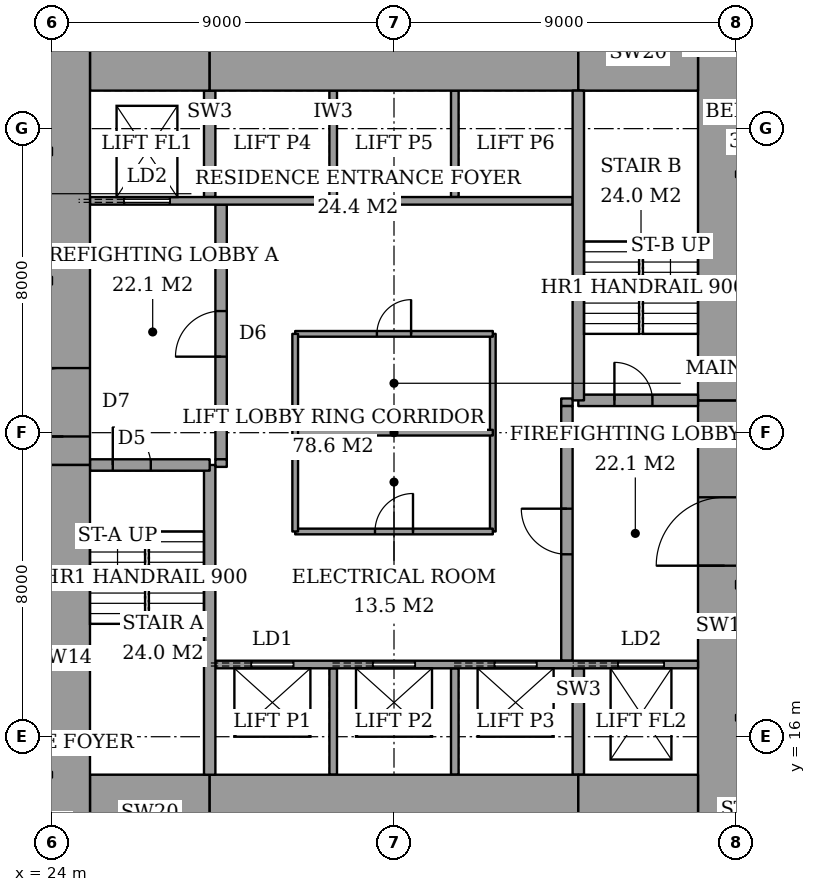
"""IFC4 building model, lengths in metres.
Left out: names, types, materials, properties, quantities, classifications, styles, units other than length and angle.
Written with IfcOpenShell. Run it as: python <this file> out.ifc"""

import sys

from ifc_helpers import new_model, si_unit, direction, frame, frame_2d, origin, place, context, subcontext, project, spatial, rectangle, extrude, element, fill, save


model = new_model("IFC4")
c1 = context("Model", 3, precision=1e-05, world=origin(), true_north=direction((0.0, 1.0)))
c2 = subcontext(c1, "Body", "Model", "MODEL_VIEW")
j1 = project(units=[si_unit("LENGTHUNIT", "METRE"), si_unit("PLANEANGLEUNIT", "RADIAN")], contexts=[c1])
p1 = place(None, origin())
s1 = spatial("IfcSite", under=j1, at=p1, CompositionType="ELEMENT")
p2 = place(p1, origin())
s2 = spatial("IfcBuilding", under=s1, at=p2, CompositionType="ELEMENT")
p3 = place(p2, frame((0.0, 0.0, 146.6)))
s3 = spatial("IfcBuildingStorey", under=s2, at=p3, CompositionType="ELEMENT", Elevation=146.6)
p4 = place(p3, frame((25.0, 14.0, 0.0), z_axis=(0.0, 0.0, 1.0), x_axis=(1.0, 0.0, 0.0)))
e1 = element("IfcWall", 1, at=p4, inside=s3, PredefinedType="SHEAR", context=c2, shape_type="SweptSolid", body=[
    extrude(rectangle(XDim=3.15, YDim=2.0, at=frame_2d((1.575, 0.0))), origin(), (0.0, 0.0, 1.0), 3.6),
])
p5 = place(p3, frame((28.15, 14.0, 0.0), z_axis=(0.0, 0.0, 1.0), x_axis=(1.0, 0.0, 0.0)))
e2 = element("IfcWall", 2, at=p5, inside=s3, PredefinedType="SHEAR", context=c2, shape_type="SweptSolid", body=[
    extrude(rectangle(XDim=9.7, YDim=2.0, at=frame_2d((4.85, 0.0))), origin(), (0.0, 0.0, 1.0), 3.6),
])
for number, where, z_axis, x_axis in (
    (3, (37.85, 14.0, 0.0), (0.0, 0.0, 1.0), (1.0, 0.0, 0.0)),
    (4, (25.0, 34.0, 0.0), (0.0, 0.0, 1.0), (1.0, 0.0, 0.0)),
):
    element("IfcWall", number, at=place(p3, frame(where, z_axis=z_axis, x_axis=x_axis)), inside=s3, PredefinedType="SHEAR", context=c2, shape_type="SweptSolid", body=[
        extrude(rectangle(XDim=3.15, YDim=2.0, at=frame_2d((1.575, 0.0))), origin(), (0.0, 0.0, 1.0), 3.6),
    ])
p6 = place(p3, frame((28.15, 34.0, 0.0), z_axis=(0.0, 0.0, 1.0), x_axis=(1.0, 0.0, 0.0)))
e5 = element("IfcWall", 5, at=p6, inside=s3, PredefinedType="SHEAR", context=c2, shape_type="SweptSolid", body=[
    extrude(rectangle(XDim=9.7, YDim=2.0, at=frame_2d((4.85, 0.0))), origin(), (0.0, 0.0, 1.0), 3.6),
])
p7 = place(p3, frame((37.85, 34.0, 0.0), z_axis=(0.0, 0.0, 1.0), x_axis=(1.0, 0.0, 0.0)))
e6 = element("IfcWall", 6, at=p7, inside=s3, PredefinedType="SHEAR", context=c2, shape_type="SweptSolid", body=[
    extrude(rectangle(XDim=3.15, YDim=2.0, at=frame_2d((1.575, 0.0))), origin(), (0.0, 0.0, 1.0), 3.6),
])
p8 = place(p3, frame((24.3, 13.0, 0.0), z_axis=(0.0, 0.0, 1.0), x_axis=(0.0, 1.0, 0.0)))
e7 = element("IfcWall", 7, at=p8, inside=s3, PredefinedType="SHEAR", context=c2, shape_type="SweptSolid", body=[
    extrude(rectangle(XDim=10.15, YDim=1.4, at=frame_2d((5.075, 0.0))), origin(), (0.0, 0.0, 1.0), 3.6),
])
p9 = place(p3, frame((24.3, 23.15, 0.0), z_axis=(0.0, 0.0, 1.0), x_axis=(0.0, 1.0, 0.0)))
e8 = element("IfcWall", 8, at=p9, inside=s3, PredefinedType="SHEAR", context=c2, shape_type="SweptSolid", body=[
    extrude(rectangle(XDim=11.85, YDim=1.4, at=frame_2d((5.925, 0.0))), origin(), (0.0, 0.0, 1.0), 3.6),
])
p10 = place(p9, frame((0.75, 0.0, 0.0)))
e9 = element("IfcOpeningElement", 9, at=p10, cuts=e8, PredefinedType="OPENING", context=c2, shape_type="SweptSolid", body=[
    extrude(rectangle(XDim=1.8, YDim=2.4, at=frame_2d((0.9, 1.2))), frame((0.0, 0.71, 0.0), z_axis=(0.0, -1.0, 0.0), x_axis=(1.0, 0.0, 0.0)), (0.0, 0.0, 1.0), 1.42),
])
p11 = place(p3, frame((41.7, 13.0, 0.0), z_axis=(0.0, 0.0, 1.0), x_axis=(0.0, 1.0, 0.0)))
e10 = element("IfcWall", 10, at=p11, inside=s3, PredefinedType="SHEAR", context=c2, shape_type="SweptSolid", body=[
    extrude(rectangle(XDim=11.85, YDim=1.4, at=frame_2d((5.925, 0.0))), origin(), (0.0, 0.0, 1.0), 3.6),
])
p12 = place(p11, frame((7.5, 0.0, 0.0)))
e11 = element("IfcOpeningElement", 11, at=p12, cuts=e10, PredefinedType="OPENING", context=c2, shape_type="SweptSolid", body=[
    extrude(rectangle(XDim=1.8, YDim=2.4, at=frame_2d((0.9, 1.2))), frame((0.0, 0.71, 0.0), z_axis=(0.0, -1.0, 0.0), x_axis=(1.0, 0.0, 0.0)), (0.0, 0.0, 1.0), 1.42),
])
p13 = place(p3, frame((41.7, 24.85, 0.0), z_axis=(0.0, 0.0, 1.0), x_axis=(0.0, 1.0, 0.0)))
e12 = element("IfcWall", 12, at=p13, inside=s3, PredefinedType="SHEAR", context=c2, shape_type="SweptSolid", body=[
    extrude(rectangle(XDim=10.15, YDim=1.4, at=frame_2d((5.075, 0.0))), origin(), (0.0, 0.0, 1.0), 3.6),
])
p14 = place(p3, frame((28.15, 15.0, 0.0), z_axis=(0.0, 0.0, 1.0), x_axis=(0.0, 1.0, 0.0)))
e13 = element("IfcWall", 13, at=p14, inside=s3, PredefinedType="SHEAR", context=c2, shape_type="SweptSolid", body=[
    extrude(rectangle(XDim=8.15, YDim=0.3, at=frame_2d((4.075, 0.0))), origin(), (0.0, 0.0, 1.0), 3.6),
])
p15 = place(p3, frame((25.0, 23.15, 0.0), z_axis=(0.0, 0.0, 1.0), x_axis=(1.0, 0.0, 0.0)))
e14 = element("IfcWall", 14, at=p15, inside=s3, PredefinedType="SHEAR", context=c2, shape_type="SweptSolid", body=[
    extrude(rectangle(XDim=3.15, YDim=0.3, at=frame_2d((1.575, 0.0))), origin(), (0.0, 0.0, 1.0), 3.6),
])
p16 = place(p15, frame((0.6, 0.0, 0.0)))
e15 = element("IfcOpeningElement", 15, at=p16, cuts=e14, PredefinedType="OPENING", context=c2, shape_type="SweptSolid", body=[
    extrude(rectangle(XDim=1.0, YDim=2.1, at=frame_2d((0.5, 1.05))), frame((0.0, 0.16, 0.0), z_axis=(0.0, -1.0, 0.0), x_axis=(1.0, 0.0, 0.0)), (0.0, 0.0, 1.0), 0.32),
])
p17 = place(p3, frame((37.85, 24.85, 0.0), z_axis=(0.0, 0.0, 1.0), x_axis=(0.0, 1.0, 0.0)))
e16 = element("IfcWall", 16, at=p17, inside=s3, PredefinedType="SHEAR", context=c2, shape_type="SweptSolid", body=[
    extrude(rectangle(XDim=8.15, YDim=0.3, at=frame_2d((4.075, 0.0))), origin(), (0.0, 0.0, 1.0), 3.6),
])
p18 = place(p3, frame((37.85, 24.85, 0.0), z_axis=(0.0, 0.0, 1.0), x_axis=(1.0, 0.0, 0.0)))
e17 = element("IfcWall", 17, at=p18, inside=s3, PredefinedType="SHEAR", context=c2, shape_type="SweptSolid", body=[
    extrude(rectangle(XDim=3.15, YDim=0.3, at=frame_2d((1.575, 0.0))), origin(), (0.0, 0.0, 1.0), 3.6),
])
p19 = place(p18, frame((0.95, 0.0, 0.0)))
e18 = element("IfcOpeningElement", 18, at=p19, cuts=e17, PredefinedType="OPENING", context=c2, shape_type="SweptSolid", body=[
    extrude(rectangle(XDim=1.0, YDim=2.1, at=frame_2d((0.5, 1.05))), frame((0.0, 0.16, 0.0), z_axis=(0.0, -1.0, 0.0), x_axis=(1.0, 0.0, 0.0)), (0.0, 0.0, 1.0), 0.32),
])
p20 = place(p3, frame((28.45, 23.3, 0.0), z_axis=(0.0, 0.0, 1.0), x_axis=(0.0, 1.0, 0.0)))
e19 = element("IfcWall", 19, at=p20, inside=s3, PredefinedType="PARTITIONING", context=c2, shape_type="SweptSolid", body=[
    extrude(rectangle(XDim=6.7, YDim=0.3, at=frame_2d((3.35, 0.0))), origin(), (0.0, 0.0, 1.0), 3.6),
])
p21 = place(p20, frame((2.7, 0.0, 0.0)))
e20 = element("IfcOpeningElement", 20, at=p21, cuts=e19, PredefinedType="OPENING", context=c2, shape_type="SweptSolid", body=[
    extrude(rectangle(XDim=1.2, YDim=2.1, at=frame_2d((0.6, 1.05))), frame((0.0, 0.16, 0.0), z_axis=(0.0, -1.0, 0.0), x_axis=(1.0, 0.0, 0.0)), (0.0, 0.0, 1.0), 0.32),
])
p22 = place(p3, frame((37.55, 18.0, 0.0), z_axis=(0.0, 0.0, 1.0), x_axis=(0.0, 1.0, 0.0)))
e21 = element("IfcWall", 21, at=p22, inside=s3, PredefinedType="PARTITIONING", context=c2, shape_type="SweptSolid", body=[
    extrude(rectangle(XDim=6.7, YDim=0.3, at=frame_2d((3.35, 0.0))), origin(), (0.0, 0.0, 1.0), 3.6),
])
p23 = place(p22, frame((2.8, 0.0, 0.0)))
e22 = element("IfcOpeningElement", 22, at=p23, cuts=e21, PredefinedType="OPENING", context=c2, shape_type="SweptSolid", body=[
    extrude(rectangle(XDim=1.2, YDim=2.1, at=frame_2d((0.6, 1.05))), frame((0.0, 0.16, 0.0), z_axis=(0.0, -1.0, 0.0), x_axis=(1.0, 0.0, 0.0)), (0.0, 0.0, 1.0), 0.32),
])
p24 = place(p3, frame((28.3, 17.9, 0.0), z_axis=(0.0, 0.0, 1.0), x_axis=(1.0, 0.0, 0.0)))
e23 = element("IfcWall", 23, at=p24, inside=s3, PredefinedType="PARTITIONING", context=c2, shape_type="SweptSolid", body=[
    extrude(rectangle(XDim=12.7, YDim=0.2, at=frame_2d((6.35, 0.0))), origin(), (0.0, 0.0, 1.0), 3.6),
])
p25 = place(p24, frame((0.95, 0.0, 0.0)))
e24 = element("IfcOpeningElement", 24, at=p25, cuts=e23, PredefinedType="OPENING", context=c2, shape_type="SweptSolid", body=[
    extrude(rectangle(XDim=1.1, YDim=2.1, at=frame_2d((0.55, 1.05))), frame((0.0, 0.11, 0.0), z_axis=(0.0, -1.0, 0.0), x_axis=(1.0, 0.0, 0.0)), (0.0, 0.0, 1.0), 0.22),
])
p26 = place(p24, frame((4.15, 0.0, 0.0)))
e25 = element("IfcOpeningElement", 25, at=p26, cuts=e23, PredefinedType="OPENING", context=c2, shape_type="SweptSolid", body=[
    extrude(rectangle(XDim=1.1, YDim=2.1, at=frame_2d((0.55, 1.05))), frame((0.0, 0.11, 0.0), z_axis=(0.0, -1.0, 0.0), x_axis=(1.0, 0.0, 0.0)), (0.0, 0.0, 1.0), 0.22),
])
p27 = place(p24, frame((7.35, 0.0, 0.0)))
e26 = element("IfcOpeningElement", 26, at=p27, cuts=e23, PredefinedType="OPENING", context=c2, shape_type="SweptSolid", body=[
    extrude(rectangle(XDim=1.1, YDim=2.1, at=frame_2d((0.55, 1.05))), frame((0.0, 0.11, 0.0), z_axis=(0.0, -1.0, 0.0), x_axis=(1.0, 0.0, 0.0)), (0.0, 0.0, 1.0), 0.22),
])
p28 = place(p24, frame((10.6, 0.0, 0.0)))
e27 = element("IfcOpeningElement", 27, at=p28, cuts=e23, PredefinedType="OPENING", context=c2, shape_type="SweptSolid", body=[
    extrude(rectangle(XDim=1.2, YDim=2.1, at=frame_2d((0.6, 1.05))), frame((0.0, 0.11, 0.0), z_axis=(0.0, -1.0, 0.0), x_axis=(1.0, 0.0, 0.0)), (0.0, 0.0, 1.0), 0.22),
])
p29 = place(p3, frame((25.0, 30.1, 0.0), z_axis=(0.0, 0.0, 1.0), x_axis=(1.0, 0.0, 0.0)))
e28 = element("IfcWall", 28, at=p29, inside=s3, PredefinedType="PARTITIONING", context=c2, shape_type="SweptSolid", body=[
    extrude(rectangle(XDim=12.7, YDim=0.2, at=frame_2d((6.35, 0.0))), origin(), (0.0, 0.0, 1.0), 3.6),
])
p30 = place(p29, frame((0.9, 0.0, 0.0)))
e29 = element("IfcOpeningElement", 29, at=p30, cuts=e28, PredefinedType="OPENING", context=c2, shape_type="SweptSolid", body=[
    extrude(rectangle(XDim=1.2, YDim=2.1, at=frame_2d((0.6, 1.05))), frame((0.0, 0.11, 0.0), z_axis=(0.0, -1.0, 0.0), x_axis=(1.0, 0.0, 0.0)), (0.0, 0.0, 1.0), 0.22),
])
for number, where, z_axis, x_axis in (
    (30, (31.4, 15.0, 0.0), (0.0, 0.0, 1.0), (0.0, 1.0, 0.0)),
    (31, (34.6, 15.0, 0.0), (0.0, 0.0, 1.0), (0.0, 1.0, 0.0)),
):
    element("IfcWall", number, at=place(p3, frame(where, z_axis=z_axis, x_axis=x_axis)), inside=s3, PredefinedType="PARTITIONING", context=c2, shape_type="SweptSolid", body=[
        extrude(rectangle(XDim=2.8, YDim=0.2, at=frame_2d((1.4, 0.0))), origin(), (0.0, 0.0, 1.0), 3.6),
    ])
p31 = place(p3, frame((37.85, 15.0, 0.0), z_axis=(0.0, 0.0, 1.0), x_axis=(0.0, 1.0, 0.0)))
e32 = element("IfcWall", 32, at=p31, inside=s3, PredefinedType="SHEAR", context=c2, shape_type="SweptSolid", body=[
    extrude(rectangle(XDim=2.8, YDim=0.3, at=frame_2d((1.4, 0.0))), origin(), (0.0, 0.0, 1.0), 3.6),
])
for number, where, z_axis, x_axis in (
    (33, (31.4, 30.2, 0.0), (0.0, 0.0, 1.0), (0.0, 1.0, 0.0)),
    (34, (34.6, 30.2, 0.0), (0.0, 0.0, 1.0), (0.0, 1.0, 0.0)),
):
    element("IfcWall", number, at=place(p3, frame(where, z_axis=z_axis, x_axis=x_axis)), inside=s3, PredefinedType="PARTITIONING", context=c2, shape_type="SweptSolid", body=[
        extrude(rectangle(XDim=2.8, YDim=0.2, at=frame_2d((1.4, 0.0))), origin(), (0.0, 0.0, 1.0), 3.6),
    ])
p32 = place(p3, frame((28.15, 30.2, 0.0), z_axis=(0.0, 0.0, 1.0), x_axis=(0.0, 1.0, 0.0)))
e35 = element("IfcWall", 35, at=p32, inside=s3, PredefinedType="SHEAR", context=c2, shape_type="SweptSolid", body=[
    extrude(rectangle(XDim=2.8, YDim=0.3, at=frame_2d((1.4, 0.0))), origin(), (0.0, 0.0, 1.0), 3.6),
])
for number, where, z_axis, x_axis in (
    (36, (28.3, 23.2, 0.0), (0.0, 0.0, 1.0), (1.0, 0.0, 0.0)),
    (37, (37.4, 24.8, 0.0), (0.0, 0.0, 1.0), (1.0, 0.0, 0.0)),
):
    element("IfcWall", number, at=place(p3, frame(where, z_axis=z_axis, x_axis=x_axis)), inside=s3, PredefinedType="PARTITIONING", context=c2, shape_type="SweptSolid", body=[
        extrude(rectangle(XDim=0.3, YDim=0.2, at=frame_2d((0.15, 0.0))), origin(), (0.0, 0.0, 1.0), 3.6),
    ])
p33 = place(p3, frame((30.4, 21.4, 0.0), z_axis=(0.0, 0.0, 1.0), x_axis=(1.0, 0.0, 0.0)))
e38 = element("IfcWall", 38, at=p33, inside=s3, PredefinedType="PARTITIONING", context=c2, shape_type="SweptSolid", body=[
    extrude(rectangle(XDim=5.2, YDim=0.15, at=frame_2d((2.6, 0.0))), origin(), (0.0, 0.0, 1.0), 3.35),
])
p34 = place(p33, frame((2.1, 0.0, 0.0)))
e39 = element("IfcOpeningElement", 39, at=p34, cuts=e38, PredefinedType="OPENING", context=c2, shape_type="SweptSolid", body=[
    extrude(rectangle(XDim=1.0, YDim=2.1, at=frame_2d((0.5, 1.05))), frame((0.0, 0.085, 0.0), z_axis=(0.0, -1.0, 0.0), x_axis=(1.0, 0.0, 0.0)), (0.0, 0.0, 1.0), 0.17),
])
p35 = place(p3, frame((30.4, 26.6, 0.0), z_axis=(0.0, 0.0, 1.0), x_axis=(1.0, 0.0, 0.0)))
e40 = element("IfcWall", 40, at=p35, inside=s3, PredefinedType="PARTITIONING", context=c2, shape_type="SweptSolid", body=[
    extrude(rectangle(XDim=5.2, YDim=0.15, at=frame_2d((2.6, 0.0))), origin(), (0.0, 0.0, 1.0), 3.35),
])
p36 = place(p35, frame((2.15, 0.0, 0.0)))
e41 = element("IfcOpeningElement", 41, at=p36, cuts=e40, PredefinedType="OPENING", context=c2, shape_type="SweptSolid", body=[
    extrude(rectangle(XDim=0.9, YDim=2.1, at=frame_2d((0.45, 1.05))), frame((0.0, 0.085, 0.0), z_axis=(0.0, -1.0, 0.0), x_axis=(1.0, 0.0, 0.0)), (0.0, 0.0, 1.0), 0.17),
])
for number, where, z_axis, x_axis in (
    (42, (30.4, 21.4, 0.0), (0.0, 0.0, 1.0), (0.0, 1.0, 0.0)),
    (43, (35.6, 21.4, 0.0), (0.0, 0.0, 1.0), (0.0, 1.0, 0.0)),
    (44, (30.4, 24.0, 0.0), (0.0, 0.0, 1.0), (1.0, 0.0, 0.0)),
):
    element("IfcWall", number, at=place(p3, frame(where, z_axis=z_axis, x_axis=x_axis)), inside=s3, PredefinedType="PARTITIONING", context=c2, shape_type="SweptSolid", body=[
        extrude(rectangle(XDim=5.2, YDim=0.15, at=frame_2d((2.6, 0.0))), origin(), (0.0, 0.0, 1.0), 3.35),
    ])
p37 = place(p16, origin())
e45 = element("IfcDoor", 45, at=p37, inside=s3, OperationType="SINGLE_SWING_RIGHT", PredefinedType="DOOR", context=c2, shape_type="SweptSolid", body=[
    extrude(rectangle(XDim=1.0, YDim=2.1, at=frame_2d((0.5, 1.05))), frame((0.0, 0.025, 0.0), z_axis=(0.0, -1.0, 0.0), x_axis=(1.0, 0.0, 0.0)), (0.0, 0.0, 1.0), 0.05),
])
fill(e15, e45)
p38 = place(p19, origin())
e46 = element("IfcDoor", 46, at=p38, inside=s3, OperationType="SINGLE_SWING_RIGHT", PredefinedType="DOOR", context=c2, shape_type="SweptSolid", body=[
    extrude(rectangle(XDim=1.0, YDim=2.1, at=frame_2d((0.5, 1.05))), frame((0.0, 0.025, 0.0), z_axis=(0.0, -1.0, 0.0), x_axis=(1.0, 0.0, 0.0)), (0.0, 0.0, 1.0), 0.05),
])
fill(e18, e46)
p39 = place(p21, origin())
e47 = element("IfcDoor", 47, at=p39, inside=s3, OperationType="SINGLE_SWING_RIGHT", PredefinedType="DOOR", context=c2, shape_type="SweptSolid", body=[
    extrude(rectangle(XDim=1.2, YDim=2.1, at=frame_2d((0.6, 1.05))), frame((0.0, 0.025, 0.0), z_axis=(0.0, -1.0, 0.0), x_axis=(1.0, 0.0, 0.0)), (0.0, 0.0, 1.0), 0.05),
])
fill(e20, e47)
p40 = place(p23, origin())
e48 = element("IfcDoor", 48, at=p40, inside=s3, OperationType="SINGLE_SWING_LEFT", PredefinedType="DOOR", context=c2, shape_type="SweptSolid", body=[
    extrude(rectangle(XDim=1.2, YDim=2.1, at=frame_2d((0.6, 1.05))), frame((0.0, 0.025, 0.0), z_axis=(0.0, -1.0, 0.0), x_axis=(1.0, 0.0, 0.0)), (0.0, 0.0, 1.0), 0.05),
])
fill(e22, e48)
p41 = place(p10, origin())
e49 = element("IfcDoor", 49, at=p41, inside=s3, OperationType="DOUBLE_DOOR_DOUBLE_SWING", PredefinedType="DOOR", context=c2, shape_type="SweptSolid", body=[
    extrude(rectangle(XDim=1.8, YDim=2.4, at=frame_2d((0.9, 1.2))), frame((0.0, 0.025, 0.0), z_axis=(0.0, -1.0, 0.0), x_axis=(1.0, 0.0, 0.0)), (0.0, 0.0, 1.0), 0.05),
])
fill(e9, e49)
p42 = place(p12, origin())
e50 = element("IfcDoor", 50, at=p42, inside=s3, OperationType="DOUBLE_DOOR_DOUBLE_SWING", PredefinedType="DOOR", context=c2, shape_type="SweptSolid", body=[
    extrude(rectangle(XDim=1.8, YDim=2.4, at=frame_2d((0.9, 1.2))), frame((0.0, 0.025, 0.0), z_axis=(0.0, -1.0, 0.0), x_axis=(1.0, 0.0, 0.0)), (0.0, 0.0, 1.0), 0.05),
])
fill(e11, e50)
p43 = place(p34, origin())
e51 = element("IfcDoor", 51, at=p43, inside=s3, OperationType="SINGLE_SWING_LEFT", PredefinedType="DOOR", context=c2, shape_type="SweptSolid", body=[
    extrude(rectangle(XDim=1.0, YDim=2.1, at=frame_2d((0.5, 1.05))), frame((0.0, 0.025, 0.0), z_axis=(0.0, -1.0, 0.0), x_axis=(1.0, 0.0, 0.0)), (0.0, 0.0, 1.0), 0.05),
])
fill(e39, e51)
p44 = place(p36, origin())
e52 = element("IfcDoor", 52, at=p44, inside=s3, OperationType="SINGLE_SWING_LEFT", PredefinedType="DOOR", context=c2, shape_type="SweptSolid", body=[
    extrude(rectangle(XDim=0.9, YDim=2.1, at=frame_2d((0.45, 1.05))), frame((0.0, 0.025, 0.0), z_axis=(0.0, -1.0, 0.0), x_axis=(1.0, 0.0, 0.0)), (0.0, 0.0, 1.0), 0.05),
])
fill(e41, e52)
p45 = place(p25, origin())
e53 = element("IfcDoor", 53, at=p45, inside=s3, OperationType="SLIDING_TO_LEFT", PredefinedType="DOOR", context=c2, shape_type="SweptSolid", body=[
    extrude(rectangle(XDim=1.1, YDim=2.1, at=frame_2d((0.55, 1.05))), frame((0.0, 0.025, 0.0), z_axis=(0.0, -1.0, 0.0), x_axis=(1.0, 0.0, 0.0)), (0.0, 0.0, 1.0), 0.05),
])
fill(e24, e53)
p46 = place(p26, origin())
e54 = element("IfcDoor", 54, at=p46, inside=s3, OperationType="SLIDING_TO_LEFT", PredefinedType="DOOR", context=c2, shape_type="SweptSolid", body=[
    extrude(rectangle(XDim=1.1, YDim=2.1, at=frame_2d((0.55, 1.05))), frame((0.0, 0.025, 0.0), z_axis=(0.0, -1.0, 0.0), x_axis=(1.0, 0.0, 0.0)), (0.0, 0.0, 1.0), 0.05),
])
fill(e25, e54)
p47 = place(p27, origin())
e55 = element("IfcDoor", 55, at=p47, inside=s3, OperationType="SLIDING_TO_LEFT", PredefinedType="DOOR", context=c2, shape_type="SweptSolid", body=[
    extrude(rectangle(XDim=1.1, YDim=2.1, at=frame_2d((0.55, 1.05))), frame((0.0, 0.025, 0.0), z_axis=(0.0, -1.0, 0.0), x_axis=(1.0, 0.0, 0.0)), (0.0, 0.0, 1.0), 0.05),
])
fill(e26, e55)
p48 = place(p30, origin())
e56 = element("IfcDoor", 56, at=p48, inside=s3, OperationType="SLIDING_TO_LEFT", PredefinedType="DOOR", context=c2, shape_type="SweptSolid", body=[
    extrude(rectangle(XDim=1.2, YDim=2.1, at=frame_2d((0.6, 1.05))), frame((0.0, 0.025, 0.0), z_axis=(0.0, -1.0, 0.0), x_axis=(1.0, 0.0, 0.0)), (0.0, 0.0, 1.0), 0.05),
])
fill(e29, e56)
p49 = place(p28, origin())
e57 = element("IfcDoor", 57, at=p49, inside=s3, OperationType="SLIDING_TO_LEFT", PredefinedType="DOOR", context=c2, shape_type="SweptSolid", body=[
    extrude(rectangle(XDim=1.2, YDim=2.1, at=frame_2d((0.6, 1.05))), frame((0.0, 0.025, 0.0), z_axis=(0.0, -1.0, 0.0), x_axis=(1.0, 0.0, 0.0)), (0.0, 0.0, 1.0), 0.05),
])
fill(e27, e57)
save(model, sys.argv[1])
